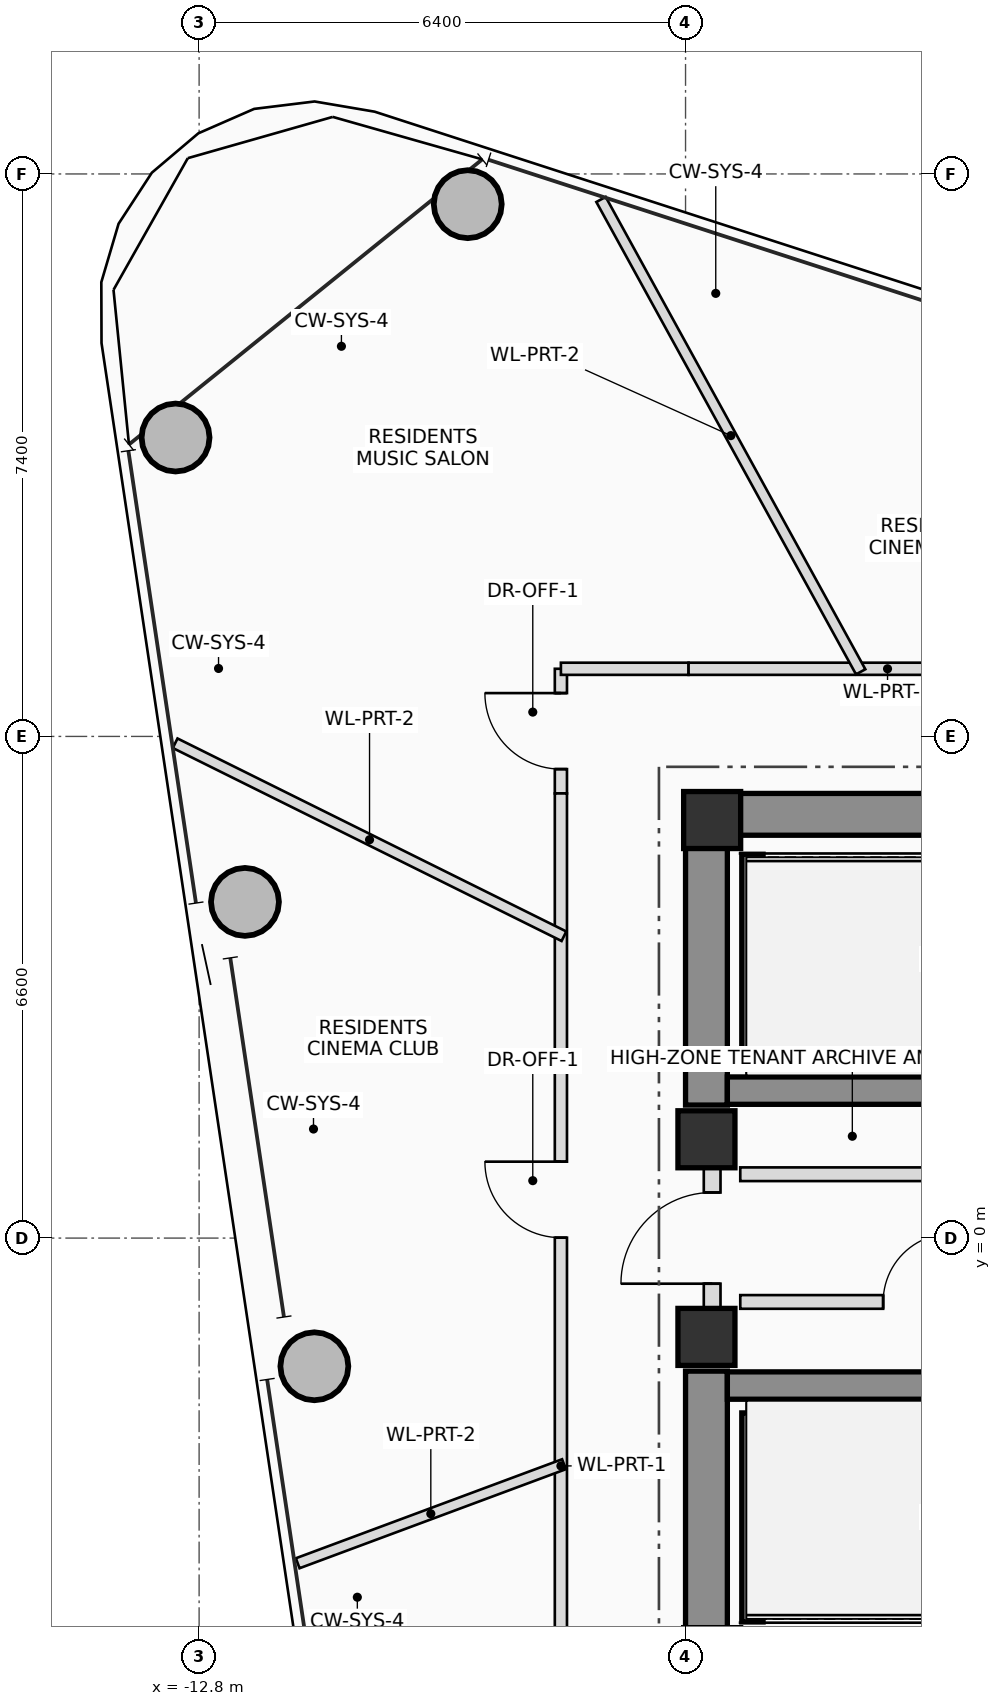
"""IFC4 building model, lengths in metres.
Left out: names, types, materials, properties, quantities, classifications, styles, units other than length and angle.
Written with IfcOpenShell. Run it as: python <this file> out.ifc"""

import sys

from ifc_helpers import new_model, si_unit, direction, frame, frame_2d, origin, origin_2d, place, context, subcontext, project, spatial, rectangle, hollow_circle, extrude, source, transform, mapped, element, fill, save


model = new_model("IFC4")
c1 = context("Model", 3, precision=1e-05, world=origin(), true_north=direction((0.0, 1.0)))
c2 = subcontext(c1, "Body", "Model", "MODEL_VIEW")
j1 = project(units=[si_unit("LENGTHUNIT", "METRE"), si_unit("PLANEANGLEUNIT", "RADIAN")], contexts=[c1])
p1 = place(None, origin())
s1 = spatial("IfcSite", under=j1, at=p1, CompositionType="ELEMENT")
p2 = place(p1, origin())
s2 = spatial("IfcBuilding", under=s1, at=p2, CompositionType="ELEMENT")
p3 = place(p2, frame((0.0, 0.0, 271.15)))
s3 = spatial("IfcBuildingStorey", under=s2, at=p3, CompositionType="ELEMENT", Elevation=271.15)
m1 = source(origin(), c2, "Body", "SweptSolid", [
    extrude(rectangle(XDim=0.75, YDim=0.75, at=origin_2d()), origin(), (0.0, 0.0, 1.0), 3.4),
])
p4 = place(p3, frame((-6.05, 5.5, 0.0), z_axis=(0.0, 0.0, 1.0), x_axis=(1.0, 0.0, 0.0)))
e1 = element("IfcColumn", 1, at=p4, inside=s3, PredefinedType="COLUMN", context=c2, shape_type="MappedRepresentation", body=[
    mapped(m1, transform((0.0, 0.0, 0.0), scale=1.0)),
])
p5 = place(p3, frame((-6.4, 5.575, 0.0), z_axis=(0.0, 0.0, 1.0), x_axis=(1.0, 0.0, 0.0)))
e2 = element("IfcWall", 2, at=p5, inside=s3, PredefinedType="SHEAR", context=c2, shape_type="SweptSolid", body=[
    extrude(rectangle(XDim=12.8, YDim=0.55, at=frame_2d((6.4, 0.0))), origin(), (0.0, 0.0, 1.0), 3.4),
])
p6 = place(p5, frame((8.6, 0.0, 0.0)))
e3 = element("IfcOpeningElement", 3, at=p6, cuts=e2, PredefinedType="OPENING", context=c2, shape_type="SweptSolid", body=[
    extrude(rectangle(XDim=1.2, YDim=2.2, at=frame_2d((0.6, 1.1))), frame((0.0, 0.285, 0.0), z_axis=(0.0, -1.0, 0.0), x_axis=(1.0, 0.0, 0.0)), (0.0, 0.0, 1.0), 0.57),
])
for number, where, z_axis, x_axis in (
    (4, (-6.125, -5.3, 0.0), (0.0, 0.0, 1.0), (0.0, 1.0, 0.0)),
    (5, (-6.125, 1.75, 0.0), (0.0, 0.0, 1.0), (0.0, 1.0, 0.0)),
):
    element("IfcWall", number, at=place(p3, frame(where, z_axis=z_axis, x_axis=x_axis)), inside=s3, PredefinedType="SHEAR", context=c2, shape_type="SweptSolid", body=[
        extrude(rectangle(XDim=3.55, YDim=0.55, at=frame_2d((1.775, 0.0))), origin(), (0.0, 0.0, 1.0), 3.4),
    ])
for number, where, z_axis, x_axis in (
    (6, (-5.85, 1.94, 0.0), (0.0, 0.0, 1.0), (1.0, 0.0, 0.0)),
    (7, (-5.85, -1.94, 0.0), (0.0, 0.0, 1.0), (1.0, 0.0, 0.0)),
):
    element("IfcWall", number, at=place(p3, frame(where, z_axis=z_axis, x_axis=x_axis)), inside=s3, PredefinedType="SHEAR", context=c2, shape_type="SweptSolid", body=[
        extrude(rectangle(XDim=11.7, YDim=0.36, at=frame_2d((5.85, 0.0))), origin(), (0.0, 0.0, 1.0), 3.4),
    ])
for number, where, z_axis, x_axis in (
    (8, (-5.52, 2.3, 0.0), (0.0, 0.0, 1.0), (0.0, 1.0, 0.0)),
    (9, (-5.52, -5.05, 0.0), (0.0, 0.0, 1.0), (0.0, 1.0, 0.0)),
):
    element("IfcWall", number, at=place(p3, frame(where, z_axis=z_axis, x_axis=x_axis)), inside=s3, PredefinedType="SHEAR", context=c2, shape_type="SweptSolid", body=[
        extrude(rectangle(XDim=2.75, YDim=0.28, at=frame_2d((1.375, 0.0))), origin(), (0.0, 0.0, 1.0), 3.4),
    ])
for number, where, z_axis, x_axis in (
    (10, (-6.125, -1.3, 0.0), (0.0, 0.0, 1.0), (1.0, 0.0, 0.0)),
    (11, (-6.125, 1.3, 0.0), (0.0, 0.0, 1.0), (1.0, 0.0, 0.0)),
):
    element("IfcColumn", number, at=place(p3, frame(where, z_axis=z_axis, x_axis=x_axis)), inside=s3, PredefinedType="COLUMN", context=c2, shape_type="MappedRepresentation", body=[
        mapped(m1, transform((0.0, 0.0, 0.0), scale=1.0)),
    ])
m2 = source(origin(), c2, "Body", "SweptSolid", [
    extrude(hollow_circle(Radius=0.45, WallThickness=0.032, at=origin_2d()), origin(), (0.0, 0.0, 1.0), 3.4),
])
for number, where, z_axis, x_axis in (
    (12, (-9.266, 13.602, 0.0), (0.0, 0.0, 1.0), (1.0, 0.0, 0.0)),
    (13, (-13.11, 10.532, 0.0), (0.0, 0.0, 1.0), (1.0, 0.0, 0.0)),
    (14, (-12.197, 4.423, 0.0), (0.0, 0.0, 1.0), (1.0, 0.0, 0.0)),
    (15, (-11.284, -1.686, 0.0), (0.0, 0.0, 1.0), (1.0, 0.0, 0.0)),
):
    element("IfcColumn", number, at=place(p3, frame(where, z_axis=z_axis, x_axis=x_axis)), inside=s3, PredefinedType="COLUMN", context=c2, shape_type="MappedRepresentation", body=[
        mapped(m2, transform((0.0, 0.0, 0.0), scale=1.0)),
    ])
p7 = place(p3, frame((-6.05, -0.95, 0.0), z_axis=(0.0, 0.0, 1.0), x_axis=(0.0, 1.0, 0.0)))
e16 = element("IfcWall", 16, at=p7, inside=s3, PredefinedType="PLUMBINGWALL", context=c2, shape_type="SweptSolid", body=[
    extrude(rectangle(XDim=1.9, YDim=0.22, at=frame_2d((0.95, 0.0))), origin(), (0.0, 0.0, 1.0), 2.18),
])
p8 = place(p7, frame((0.35, 0.0, 0.0)))
e17 = element("IfcOpeningElement", 17, at=p8, cuts=e16, PredefinedType="OPENING", context=c2, shape_type="SweptSolid", body=[
    extrude(rectangle(XDim=1.2, YDim=2.2, at=frame_2d((0.6, 1.1))), frame((0.0, 0.12, 0.0), z_axis=(0.0, -1.0, 0.0), x_axis=(1.0, 0.0, 0.0)), (0.0, 0.0, 1.0), 0.24),
])
p9 = place(p3, frame((-5.68, 0.84, 0.0), z_axis=(0.0, 0.0, 1.0), x_axis=(1.0, 0.0, 0.0)))
e18 = element("IfcWall", 18, at=p9, inside=s3, PredefinedType="PLUMBINGWALL", context=c2, shape_type="SweptSolid", body=[
    extrude(rectangle(XDim=11.33, YDim=0.18, at=frame_2d((5.665, 0.0))), origin(), (0.0, 0.0, 1.0), 3.2),
])
p10 = place(p9, frame((3.13, 0.0, 0.0)))
e19 = element("IfcOpeningElement", 19, at=p10, cuts=e18, PredefinedType="OPENING", context=c2, shape_type="SweptSolid", body=[
    extrude(rectangle(XDim=0.9, YDim=2.05, at=frame_2d((0.45, 1.025))), frame((0.0, 0.1, 0.0), z_axis=(0.0, -1.0, 0.0), x_axis=(1.0, 0.0, 0.0)), (0.0, 0.0, 1.0), 0.2),
])
p11 = place(p9, frame((7.33, 0.0, 0.0)))
e20 = element("IfcOpeningElement", 20, at=p11, cuts=e18, PredefinedType="OPENING", context=c2, shape_type="SweptSolid", body=[
    extrude(rectangle(XDim=1.1, YDim=2.2, at=frame_2d((0.55, 1.1))), frame((0.0, 0.1, 0.0), z_axis=(0.0, -1.0, 0.0), x_axis=(1.0, 0.0, 0.0)), (0.0, 0.0, 1.0), 0.2),
])
p12 = place(p9, frame((8.83, 0.0, 0.0)))
e21 = element("IfcOpeningElement", 21, at=p12, cuts=e18, PredefinedType="OPENING", context=c2, shape_type="SweptSolid", body=[
    extrude(rectangle(XDim=1.1, YDim=2.2, at=frame_2d((0.55, 1.1))), frame((0.0, 0.1, 0.0), z_axis=(0.0, -1.0, 0.0), x_axis=(1.0, 0.0, 0.0)), (0.0, 0.0, 1.0), 0.2),
])
p13 = place(p3, frame((-5.68, -0.84, 0.0), z_axis=(0.0, 0.0, 1.0), x_axis=(1.0, 0.0, 0.0)))
e22 = element("IfcWall", 22, at=p13, inside=s3, PredefinedType="PLUMBINGWALL", context=c2, shape_type="SweptSolid", body=[
    extrude(rectangle(XDim=10.22, YDim=0.18, at=frame_2d((5.11, 0.0))), origin(), (0.0, 0.0, 1.0), 3.2),
])
p14 = place(p13, frame((1.88, 0.0, 0.0)))
e23 = element("IfcOpeningElement", 23, at=p14, cuts=e22, PredefinedType="OPENING", context=c2, shape_type="SweptSolid", body=[
    extrude(rectangle(XDim=0.9, YDim=2.05, at=frame_2d((0.45, 1.025))), frame((0.0, 0.1, 0.0), z_axis=(0.0, -1.0, 0.0), x_axis=(1.0, 0.0, 0.0)), (0.0, 0.0, 1.0), 0.2),
])
p15 = place(p13, frame((5.35, 0.0, 0.0)))
e24 = element("IfcOpeningElement", 24, at=p15, cuts=e22, PredefinedType="OPENING", context=c2, shape_type="SweptSolid", body=[
    extrude(rectangle(XDim=0.9, YDim=2.05, at=frame_2d((0.45, 1.025))), frame((0.0, 0.1, 0.0), z_axis=(0.0, -1.0, 0.0), x_axis=(1.0, 0.0, 0.0)), (0.0, 0.0, 1.0), 0.2),
])
p16 = place(p13, frame((7.33, 0.0, 0.0)))
e25 = element("IfcOpeningElement", 25, at=p16, cuts=e22, PredefinedType="OPENING", context=c2, shape_type="SweptSolid", body=[
    extrude(rectangle(XDim=1.1, YDim=2.2, at=frame_2d((0.55, 1.1))), frame((0.0, 0.1, 0.0), z_axis=(0.0, -1.0, 0.0), x_axis=(1.0, 0.0, 0.0)), (0.0, 0.0, 1.0), 0.2),
])
p17 = place(p13, frame((9.02, 0.0, 0.0)))
e26 = element("IfcOpeningElement", 26, at=p17, cuts=e22, PredefinedType="OPENING", context=c2, shape_type="SweptSolid", body=[
    extrude(rectangle(XDim=0.9, YDim=2.05, at=frame_2d((0.45, 1.025))), frame((0.0, 0.1, 0.0), z_axis=(0.0, -1.0, 0.0), x_axis=(1.0, 0.0, 0.0)), (0.0, 0.0, 1.0), 0.2),
])
p18 = place(p3, frame((-8.04, 5.85, 0.0), z_axis=(0.0, 0.0, 1.0), x_axis=(0.0, 1.0, 0.0)))
e27 = element("IfcWall", 27, at=p18, inside=s3, PredefinedType="PARTITIONING", context=c2, shape_type="SweptSolid", body=[
    extrude(rectangle(XDim=1.64, YDim=0.16, at=frame_2d((0.82, 0.0))), origin(), (0.0, 0.0, 1.0), 2.605),
])
p19 = place(p18, frame((0.32, 0.0, 0.0)))
e28 = element("IfcOpeningElement", 28, at=p19, cuts=e27, PredefinedType="OPENING", context=c2, shape_type="SweptSolid", body=[
    extrude(rectangle(XDim=1.0, YDim=2.25, at=frame_2d((0.5, 1.125))), frame((0.0, 0.09, 0.0), z_axis=(0.0, -1.0, 0.0), x_axis=(1.0, 0.0, 0.0)), (0.0, 0.0, 1.0), 0.18),
])
p20 = place(p3, frame((-8.04, 7.49, 0.0), z_axis=(0.0, 0.0, 1.0), x_axis=(1.0, 0.0, 0.0)))
e29 = element("IfcWall", 29, at=p20, inside=s3, PredefinedType="PARTITIONING", context=c2, shape_type="SweptSolid", body=[
    extrude(rectangle(XDim=1.68, YDim=0.16, at=frame_2d((0.84, 0.0))), origin(), (0.0, 0.0, 1.0), 2.605),
])
p21 = place(p3, frame((-6.36, 7.49, 0.0), z_axis=(0.0, 0.0, 1.0), x_axis=(1.0, 0.0, 0.0)))
e30 = element("IfcWall", 30, at=p21, inside=s3, PredefinedType="PARTITIONING", context=c2, shape_type="SweptSolid", body=[
    extrude(rectangle(XDim=9.81, YDim=0.16, at=frame_2d((4.905, 0.0))), origin(), (0.0, 0.0, 1.0), 2.605),
])
p22 = place(p21, frame((5.385, 0.0, 0.0)))
e31 = element("IfcOpeningElement", 31, at=p22, cuts=e30, PredefinedType="OPENING", context=c2, shape_type="SweptSolid", body=[
    extrude(rectangle(XDim=1.0, YDim=2.25, at=frame_2d((0.5, 1.125))), frame((0.0, 0.09, 0.0), z_axis=(0.0, -1.0, 0.0), x_axis=(1.0, 0.0, 0.0)), (0.0, 0.0, 1.0), 0.18),
])
p23 = place(p3, frame((-8.04, -5.85, 0.0), z_axis=(0.0, 0.0, 1.0), x_axis=(0.0, 1.0, 0.0)))
e32 = element("IfcWall", 32, at=p23, inside=s3, PredefinedType="PARTITIONING", context=c2, shape_type="SweptSolid", body=[
    extrude(rectangle(XDim=11.7, YDim=0.16, at=frame_2d((5.85, 0.0))), origin(), (0.0, 0.0, 1.0), 2.605),
])
p24 = place(p23, frame((5.855, 0.0, 0.0)))
e33 = element("IfcOpeningElement", 33, at=p24, cuts=e32, PredefinedType="OPENING", context=c2, shape_type="SweptSolid", body=[
    extrude(rectangle(XDim=1.0, YDim=2.25, at=frame_2d((0.5, 1.125))), frame((0.0, 0.09, 0.0), z_axis=(0.0, -1.0, 0.0), x_axis=(1.0, 0.0, 0.0)), (0.0, 0.0, 1.0), 0.18),
])
p25 = place(p3, frame((-4.096, 7.45, 0.0), z_axis=(0.0, 0.0, 1.0), x_axis=(-0.481753550604, 0.876306747937, 0.0)))
e34 = element("IfcWall", 34, at=p25, inside=s3, PredefinedType="PARTITIONING", context=c2, shape_type="SweptSolid", body=[
    extrude(rectangle(XDim=7.092, YDim=0.14, at=frame_2d((3.546, 0.0))), origin(), (0.0, 0.0, 1.0), 2.605),
])
p26 = place(p3, frame((-8.0, 3.971, 0.0), z_axis=(0.0, 0.0, 1.0), x_axis=(-0.895714476241, 0.444629707793, 0.0)))
e35 = element("IfcWall", 35, at=p26, inside=s3, PredefinedType="PARTITIONING", context=c2, shape_type="SweptSolid", body=[
    extrude(rectangle(XDim=5.711, YDim=0.14, at=frame_2d((2.855, 0.0))), origin(), (0.0, 0.0, 1.0), 2.605),
])
p27 = place(p3, frame((-8.0, -2.975, 0.0), z_axis=(0.0, 0.0, 1.0), x_axis=(-0.937281421119, -0.348573575627, 0.0)))
e36 = element("IfcWall", 36, at=p27, inside=s3, PredefinedType="PARTITIONING", context=c2, shape_type="SweptSolid", body=[
    extrude(rectangle(XDim=3.737, YDim=0.14, at=frame_2d((1.869, 0.0))), origin(), (0.0, 0.0, 1.0), 2.605),
])
p28 = place(p8, origin())
e37 = element("IfcDoor", 37, at=p28, inside=s3, OperationType="SINGLE_SWING_LEFT", PredefinedType="DOOR", context=c2, shape_type="SweptSolid", body=[
    extrude(rectangle(XDim=1.2, YDim=2.2, at=frame_2d((0.6, 1.1))), frame((0.0, 0.025, 0.0), z_axis=(0.0, -1.0, 0.0), x_axis=(1.0, 0.0, 0.0)), (0.0, 0.0, 1.0), 0.05),
])
fill(e17, e37)
p29 = place(p14, origin())
e38 = element("IfcDoor", 38, at=p29, inside=s3, OperationType="SINGLE_SWING_RIGHT", PredefinedType="DOOR", context=c2, shape_type="SweptSolid", body=[
    extrude(rectangle(XDim=0.9, YDim=2.05, at=frame_2d((0.45, 1.025))), frame((0.0, 0.025, 0.0), z_axis=(0.0, -1.0, 0.0), x_axis=(1.0, 0.0, 0.0)), (0.0, 0.0, 1.0), 0.05),
])
fill(e23, e38)
p30 = place(p19, origin())
e39 = element("IfcDoor", 39, at=p30, inside=s3, OperationType="SINGLE_SWING_RIGHT", PredefinedType="DOOR", context=c2, shape_type="SweptSolid", body=[
    extrude(rectangle(XDim=1.0, YDim=2.25, at=frame_2d((0.5, 1.125))), frame((0.0, 0.025, 0.0), z_axis=(0.0, -1.0, 0.0), x_axis=(1.0, 0.0, 0.0)), (0.0, 0.0, 1.0), 0.05),
])
fill(e28, e39)
p31 = place(p24, origin())
e40 = element("IfcDoor", 40, at=p31, inside=s3, OperationType="SINGLE_SWING_RIGHT", PredefinedType="DOOR", context=c2, shape_type="SweptSolid", body=[
    extrude(rectangle(XDim=1.0, YDim=2.25, at=frame_2d((0.5, 1.125))), frame((0.0, 0.025, 0.0), z_axis=(0.0, -1.0, 0.0), x_axis=(1.0, 0.0, 0.0)), (0.0, 0.0, 1.0), 0.05),
])
fill(e33, e40)
save(model, sys.argv[1])
